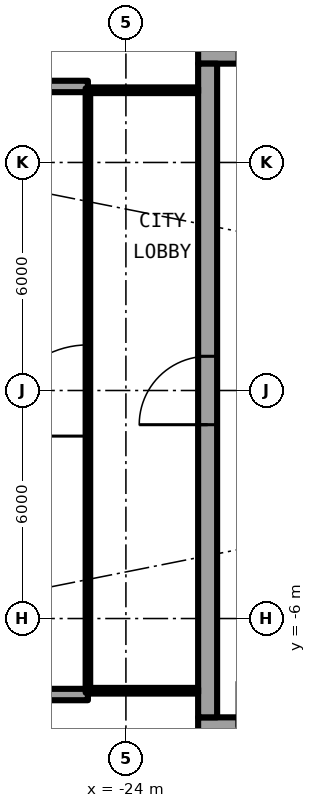
"""IFC4 building model, lengths in metres.
Left out: names, types, materials, properties, quantities, classifications, styles, units other than length and angle.
Written with IfcOpenShell. Run it as: python <this file> out.ifc"""

import sys

from ifc_helpers import new_model, si_unit, direction, frame, frame_2d, origin, place, context, subcontext, project, spatial, rectangle, extrude, element, fill, save


model = new_model("IFC4")
c1 = context("Model", 3, precision=1e-05, world=origin(), true_north=direction((0.0, 1.0)))
c2 = subcontext(c1, "Body", "Model", "MODEL_VIEW")
j1 = project(units=[si_unit("LENGTHUNIT", "METRE"), si_unit("PLANEANGLEUNIT", "RADIAN")], contexts=[c1])
p1 = place(None, origin())
s1 = spatial("IfcSite", under=j1, at=p1, CompositionType="ELEMENT")
p2 = place(p1, origin())
s2 = spatial("IfcBuilding", under=s1, at=p2, CompositionType="ELEMENT")
p3 = place(p2, frame((0.0, 0.0, 145.2)))
s3 = spatial("IfcBuildingStorey", under=s2, at=p3, CompositionType="ELEMENT", Elevation=145.2)
for number, where, z_axis, x_axis in (
    (1, (-25.0, 8.0, 0.0), (0.0, 0.0, 1.0), (-1.0, 0.0, 0.0)),
    (2, (-25.0, -8.0, 0.0), (0.0, 0.0, 1.0), (-1.0, 0.0, 0.0)),
):
    element("IfcWall", number, at=place(p3, frame(where, z_axis=z_axis, x_axis=x_axis)), inside=s3, PredefinedType="SOLIDWALL", context=c2, shape_type="SweptSolid", body=[
        extrude(rectangle(XDim=2.667, YDim=0.3, at=frame_2d((1.333, 0.0))), origin(), (0.0, 0.0, 1.0), 2.7),
    ])
p4 = place(p3, frame((-22.1, -8.85, 0.0), z_axis=(0.0, 0.0, 1.0), x_axis=(1.0, 0.0, 0.0)))
e3 = element("IfcWall", 3, at=p4, inside=s3, PredefinedType="SHEAR", context=c2, shape_type="SweptSolid", body=[
    extrude(rectangle(XDim=13.6, YDim=0.5, at=frame_2d((6.8, 0.0))), origin(), (0.0, 0.0, 1.0), 3.05),
])
p5 = place(p4, frame((1.025, 0.0, 0.0)))
e4 = element("IfcOpeningElement", 4, at=p5, cuts=e3, PredefinedType="OPENING", context=c2, shape_type="SweptSolid", body=[
    extrude(rectangle(XDim=1.2, YDim=2.3, at=frame_2d((0.6, 1.15))), frame((0.0, 0.26, 0.0), z_axis=(0.0, -1.0, 0.0), x_axis=(1.0, 0.0, 0.0)), (0.0, 0.0, 1.0), 0.52),
])
p6 = place(p3, frame((-8.5, 8.85, 0.0), z_axis=(0.0, 0.0, 1.0), x_axis=(-1.0, 0.0, 0.0)))
e5 = element("IfcWall", 5, at=p6, inside=s3, PredefinedType="SHEAR", context=c2, shape_type="SweptSolid", body=[
    extrude(rectangle(XDim=13.6, YDim=0.5, at=frame_2d((6.8, 0.0))), origin(), (0.0, 0.0, 1.0), 3.05),
])
p7 = place(p6, frame((11.375, 0.0, 0.0)))
e6 = element("IfcOpeningElement", 6, at=p7, cuts=e5, PredefinedType="OPENING", context=c2, shape_type="SweptSolid", body=[
    extrude(rectangle(XDim=1.2, YDim=2.3, at=frame_2d((0.6, 1.15))), frame((0.0, 0.26, 0.0), z_axis=(0.0, -1.0, 0.0), x_axis=(1.0, 0.0, 0.0)), (0.0, 0.0, 1.0), 0.52),
])
p8 = place(p3, frame((-21.85, -8.6, 0.0), z_axis=(0.0, 0.0, 1.0), x_axis=(0.0, 1.0, 0.0)))
e7 = element("IfcWall", 7, at=p8, inside=s3, PredefinedType="SHEAR", context=c2, shape_type="SweptSolid", body=[
    extrude(rectangle(XDim=17.2, YDim=0.5, at=frame_2d((8.6, 0.0))), origin(), (0.0, 0.0, 1.0), 3.05),
])
p9 = place(p8, frame((7.7, 0.0, 0.0)))
e8 = element("IfcOpeningElement", 8, at=p9, cuts=e7, PredefinedType="OPENING", context=c2, shape_type="SweptSolid", body=[
    extrude(rectangle(XDim=1.8, YDim=2.3, at=frame_2d((0.9, 1.15))), frame((0.0, 0.26, 0.0), z_axis=(0.0, -1.0, 0.0), x_axis=(1.0, 0.0, 0.0)), (0.0, 0.0, 1.0), 0.52),
])
for number, where, z_axis, x_axis in (
    (9, (-22.1, 7.9, 0.0), (0.0, 0.0, 1.0), (-1.0, 0.0, 0.0)),
    (10, (-22.1, -7.9, 0.0), (0.0, 0.0, 1.0), (-1.0, 0.0, 0.0)),
):
    element("IfcWall", number, at=place(p3, frame(where, z_axis=z_axis, x_axis=x_axis)), inside=s3, PredefinedType="PARTITIONING", context=c2, shape_type="SweptSolid", body=[
        extrude(rectangle(XDim=2.84, YDim=0.15, at=frame_2d((1.42, 0.0))), origin(), (0.0, 0.0, 1.0), 2.7),
    ])
p10 = place(p3, frame((-25.0, -7.95, 0.0), z_axis=(0.0, 0.0, 1.0), x_axis=(0.0, 1.0, 0.0)))
e11 = element("IfcWall", 11, at=p10, inside=s3, PredefinedType="PARTITIONING", context=c2, shape_type="SweptSolid", body=[
    extrude(rectangle(XDim=15.9, YDim=0.12, at=frame_2d((7.95, 0.0))), origin(), (0.0, 0.0, 1.0), 2.7),
])
p11 = place(p10, frame((6.75, 0.0, 0.0)))
e12 = element("IfcOpeningElement", 12, at=p11, cuts=e11, PredefinedType="OPENING", context=c2, shape_type="SweptSolid", body=[
    extrude(rectangle(XDim=2.4, YDim=2.3, at=frame_2d((1.2, 1.15))), frame((0.0, 0.07, 0.0), z_axis=(0.0, -1.0, 0.0), x_axis=(1.0, 0.0, 0.0)), (0.0, 0.0, 1.0), 0.14),
])
p12 = place(p10, frame((11.55, 0.0, 0.1)))
e13 = element("IfcOpeningElement", 13, at=p12, cuts=e11, PredefinedType="OPENING", context=c2, shape_type="SweptSolid", body=[
    extrude(rectangle(XDim=3.4, YDim=2.35, at=frame_2d((1.7, 1.175))), frame((0.0, 0.07, 0.0), z_axis=(0.0, -1.0, 0.0), x_axis=(1.0, 0.0, 0.0)), (0.0, 0.0, 1.0), 0.14),
])
p13 = place(p10, frame((0.95, 0.0, 0.1)))
e14 = element("IfcOpeningElement", 14, at=p13, cuts=e11, PredefinedType="OPENING", context=c2, shape_type="SweptSolid", body=[
    extrude(rectangle(XDim=3.4, YDim=2.35, at=frame_2d((1.7, 1.175))), frame((0.0, 0.07, 0.0), z_axis=(0.0, -1.0, 0.0), x_axis=(1.0, 0.0, 0.0)), (0.0, 0.0, 1.0), 0.14),
])
p14 = place(p9, origin())
e15 = element("IfcDoor", 15, at=p14, inside=s3, OperationType="SINGLE_SWING_LEFT", PredefinedType="DOOR", context=c2, shape_type="SweptSolid", body=[
    extrude(rectangle(XDim=1.8, YDim=2.3, at=frame_2d((0.9, 1.15))), frame((0.0, 0.025, 0.0), z_axis=(0.0, -1.0, 0.0), x_axis=(1.0, 0.0, 0.0)), (0.0, 0.0, 1.0), 0.05),
])
fill(e8, e15)
p15 = place(p11, origin())
e16 = element("IfcDoor", 16, at=p15, inside=s3, OperationType="SINGLE_SWING_LEFT", PredefinedType="DOOR", context=c2, shape_type="SweptSolid", body=[
    extrude(rectangle(XDim=2.4, YDim=2.3, at=frame_2d((1.2, 1.15))), frame((0.0, 0.025, 0.0), z_axis=(0.0, -1.0, 0.0), x_axis=(1.0, 0.0, 0.0)), (0.0, 0.0, 1.0), 0.05),
])
fill(e12, e16)
p16 = place(p12, origin())
e17 = element("IfcWindow", 17, at=p16, inside=s3, PartitioningType="SINGLE_PANEL", PredefinedType="WINDOW", context=c2, shape_type="SweptSolid", body=[
    extrude(rectangle(XDim=3.4, YDim=2.35, at=frame_2d((1.7, 1.175))), frame((0.0, 0.03, 0.0), z_axis=(0.0, -1.0, 0.0), x_axis=(1.0, 0.0, 0.0)), (0.0, 0.0, 1.0), 0.06),
])
fill(e13, e17)
p17 = place(p13, origin())
e18 = element("IfcWindow", 18, at=p17, inside=s3, PartitioningType="SINGLE_PANEL", PredefinedType="WINDOW", context=c2, shape_type="SweptSolid", body=[
    extrude(rectangle(XDim=3.4, YDim=2.35, at=frame_2d((1.7, 1.175))), frame((0.0, 0.03, 0.0), z_axis=(0.0, -1.0, 0.0), x_axis=(1.0, 0.0, 0.0)), (0.0, 0.0, 1.0), 0.06),
])
fill(e14, e18)
save(model, sys.argv[1])
